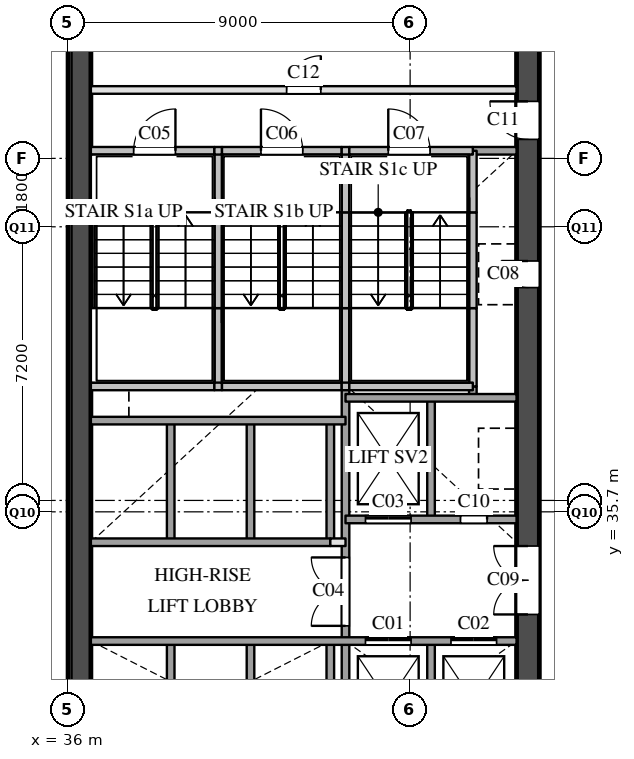
"""IFC4 building model, lengths in metres.
Left out: names, types, materials, properties, quantities, classifications, styles, units other than length and angle.
Written with IfcOpenShell. Run it as: python <this file> out.ifc"""

import sys

from ifc_helpers import new_model, si_unit, direction, frame, frame_2d, origin, place, context, subcontext, project, spatial, rectangle, extrude, element, fill, save


model = new_model("IFC4")
c1 = context("Model", 3, precision=1e-05, world=origin(), true_north=direction((0.0, 1.0)))
c2 = subcontext(c1, "Body", "Model", "MODEL_VIEW")
j1 = project(units=[si_unit("LENGTHUNIT", "METRE"), si_unit("PLANEANGLEUNIT", "RADIAN")], contexts=[c1])
p1 = place(None, origin())
s1 = spatial("IfcSite", under=j1, at=p1, CompositionType="ELEMENT")
p2 = place(p1, origin())
s2 = spatial("IfcBuilding", under=s1, at=p2, CompositionType="ELEMENT")
p3 = place(p2, frame((0.0, 0.0, 21.0)))
s3 = spatial("IfcBuildingStorey", under=s2, at=p3, CompositionType="ELEMENT", Elevation=21.0)
p4 = place(p3, frame((36.3, 29.1, 0.0), z_axis=(0.0, 0.0, 1.0), x_axis=(0.0, 1.0, 0.0)))
e1 = element("IfcWall", 1, at=p4, inside=s3, PredefinedType="SHEAR", context=c2, shape_type="SweptSolid", body=[
    extrude(rectangle(XDim=20.3, YDim=0.6, at=frame_2d((10.15, 0.0))), origin(), (0.0, 0.0, 1.0), 4.55),
])
p5 = place(p3, frame((48.1, 29.1, 0.0), z_axis=(0.0, 0.0, 1.0), x_axis=(0.0, 1.0, 0.0)))
e2 = element("IfcWall", 2, at=p5, inside=s3, PredefinedType="SHEAR", context=c2, shape_type="SweptSolid", body=[
    extrude(rectangle(XDim=20.3, YDim=0.6, at=frame_2d((10.15, 0.0))), origin(), (0.0, 0.0, 1.0), 4.55),
])
p6 = place(p5, frame((12.5, 0.0, 0.0)))
e3 = element("IfcOpeningElement", 3, at=p6, cuts=e2, PredefinedType="OPENING", context=c2, shape_type="SweptSolid", body=[
    extrude(rectangle(XDim=0.7, YDim=2.1, at=frame_2d((0.35, 1.05))), frame((0.0, 0.31, 0.0), z_axis=(0.0, -1.0, 0.0), x_axis=(1.0, 0.0, 0.0)), (0.0, 0.0, 1.0), 0.62),
])
p7 = place(p5, frame((3.9, 0.0, 0.0)))
e4 = element("IfcOpeningElement", 4, at=p7, cuts=e2, PredefinedType="OPENING", context=c2, shape_type="SweptSolid", body=[
    extrude(rectangle(XDim=1.8, YDim=2.1, at=frame_2d((0.9, 1.05))), frame((0.0, 0.31, 0.0), z_axis=(0.0, -1.0, 0.0), x_axis=(1.0, 0.0, 0.0)), (0.0, 0.0, 1.0), 0.62),
])
p8 = place(p5, frame((16.4, 0.0, 0.0)))
e5 = element("IfcOpeningElement", 5, at=p8, cuts=e2, PredefinedType="OPENING", context=c2, shape_type="SweptSolid", body=[
    extrude(rectangle(XDim=1.0, YDim=2.1, at=frame_2d((0.5, 1.05))), frame((0.0, 0.31, 0.0), z_axis=(0.0, -1.0, 0.0), x_axis=(1.0, 0.0, 0.0)), (0.0, 0.0, 1.0), 0.62),
])
p9 = place(p3, frame((38.7, 29.1, 0.0), z_axis=(0.0, 0.0, 1.0), x_axis=(0.0, 1.0, 0.0)))
e6 = element("IfcWall", 6, at=p9, inside=s3, PredefinedType="SOLIDWALL", context=c2, shape_type="SweptSolid", body=[
    extrude(rectangle(XDim=3.2, YDim=0.2, at=frame_2d((1.6, 0.0))), origin(), (0.0, 0.0, 1.0), 4.55),
])
p10 = place(p3, frame((38.7, 34.9, 0.0), z_axis=(0.0, 0.0, 1.0), x_axis=(0.0, 1.0, 0.0)))
e7 = element("IfcWall", 7, at=p10, inside=s3, PredefinedType="SOLIDWALL", context=c2, shape_type="SweptSolid", body=[
    extrude(rectangle(XDim=3.2, YDim=0.2, at=frame_2d((1.6, 0.0))), origin(), (0.0, 0.0, 1.0), 4.55),
])
p11 = place(p3, frame((39.95, 39.0, 0.0), z_axis=(0.0, 0.0, 1.0), x_axis=(0.0, 1.0, 0.0)))
e8 = element("IfcWall", 8, at=p11, inside=s3, PredefinedType="SOLIDWALL", context=c2, shape_type="SweptSolid", body=[
    extrude(rectangle(XDim=2.06, YDim=0.2, at=frame_2d((1.03, 0.0))), origin(), (0.0, 0.0, 1.0), 4.55),
])
p12 = place(p3, frame((39.95, 41.06, 0.0), z_axis=(0.0, 0.0, 1.0), x_axis=(0.0, 1.0, 0.0)))
e9 = element("IfcWall", 9, at=p12, inside=s3, PredefinedType="SOLIDWALL", context=c2, shape_type="SweptSolid", body=[
    extrude(rectangle(XDim=2.52, YDim=0.2, at=frame_2d((1.26, 0.0))), origin(), (0.0, 0.0, 1.0), 4.55),
])
p13 = place(p3, frame((39.95, 43.58, 0.0), z_axis=(0.0, 0.0, 1.0), x_axis=(0.0, 1.0, 0.0)))
e10 = element("IfcWall", 10, at=p13, inside=s3, PredefinedType="SOLIDWALL", context=c2, shape_type="SweptSolid", body=[
    extrude(rectangle(XDim=1.62, YDim=0.2, at=frame_2d((0.81, 0.0))), origin(), (0.0, 0.0, 1.0), 4.55),
])
p14 = place(p3, frame((40.8, 29.1, 0.0), z_axis=(0.0, 0.0, 1.0), x_axis=(0.0, 1.0, 0.0)))
e11 = element("IfcWall", 11, at=p14, inside=s3, PredefinedType="SOLIDWALL", context=c2, shape_type="SweptSolid", body=[
    extrude(rectangle(XDim=3.2, YDim=0.2, at=frame_2d((1.6, 0.0))), origin(), (0.0, 0.0, 1.0), 4.55),
])
p15 = place(p3, frame((40.8, 34.9, 0.0), z_axis=(0.0, 0.0, 1.0), x_axis=(0.0, 1.0, 0.0)))
e12 = element("IfcWall", 12, at=p15, inside=s3, PredefinedType="SOLIDWALL", context=c2, shape_type="SweptSolid", body=[
    extrude(rectangle(XDim=3.2, YDim=0.2, at=frame_2d((1.6, 0.0))), origin(), (0.0, 0.0, 1.0), 4.55),
])
p16 = place(p3, frame((42.9, 29.1, 0.0), z_axis=(0.0, 0.0, 1.0), x_axis=(0.0, 1.0, 0.0)))
e13 = element("IfcWall", 13, at=p16, inside=s3, PredefinedType="SOLIDWALL", context=c2, shape_type="SweptSolid", body=[
    extrude(rectangle(XDim=3.2, YDim=0.2, at=frame_2d((1.6, 0.0))), origin(), (0.0, 0.0, 1.0), 4.55),
])
p17 = place(p3, frame((42.9, 34.9, 0.0), z_axis=(0.0, 0.0, 1.0), x_axis=(0.0, 1.0, 0.0)))
e14 = element("IfcWall", 14, at=p17, inside=s3, PredefinedType="SOLIDWALL", context=c2, shape_type="SweptSolid", body=[
    extrude(rectangle(XDim=3.2, YDim=0.2, at=frame_2d((1.6, 0.0))), origin(), (0.0, 0.0, 1.0), 4.55),
])
p18 = place(p3, frame((43.3, 29.1, 0.0), z_axis=(0.0, 0.0, 1.0), x_axis=(0.0, 1.0, 0.0)))
e15 = element("IfcWall", 15, at=p18, inside=s3, PredefinedType="SOLIDWALL", context=c2, shape_type="SweptSolid", body=[
    extrude(rectangle(XDim=9.9, YDim=0.2, at=frame_2d((4.95, 0.0))), origin(), (0.0, 0.0, 1.0), 4.55),
])
p19 = place(p18, frame((3.6, 0.0, 0.0)))
e16 = element("IfcOpeningElement", 16, at=p19, cuts=e15, PredefinedType="OPENING", context=c2, shape_type="SweptSolid", body=[
    extrude(rectangle(XDim=1.8, YDim=2.1, at=frame_2d((0.9, 1.05))), frame((0.0, 0.11, 0.0), z_axis=(0.0, -1.0, 0.0), x_axis=(1.0, 0.0, 0.0)), (0.0, 0.0, 1.0), 0.22),
])
p20 = place(p3, frame((43.3, 39.0, 0.0), z_axis=(0.0, 0.0, 1.0), x_axis=(0.0, 1.0, 0.0)))
e17 = element("IfcWall", 17, at=p20, inside=s3, PredefinedType="SOLIDWALL", context=c2, shape_type="SweptSolid", body=[
    extrude(rectangle(XDim=2.06, YDim=0.2, at=frame_2d((1.03, 0.0))), origin(), (0.0, 0.0, 1.0), 4.55),
])
p21 = place(p3, frame((43.3, 41.06, 0.0), z_axis=(0.0, 0.0, 1.0), x_axis=(0.0, 1.0, 0.0)))
e18 = element("IfcWall", 18, at=p21, inside=s3, PredefinedType="SOLIDWALL", context=c2, shape_type="SweptSolid", body=[
    extrude(rectangle(XDim=2.52, YDim=0.2, at=frame_2d((1.26, 0.0))), origin(), (0.0, 0.0, 1.0), 4.55),
])
p22 = place(p3, frame((43.3, 43.58, 0.0), z_axis=(0.0, 0.0, 1.0), x_axis=(0.0, 1.0, 0.0)))
e19 = element("IfcWall", 19, at=p22, inside=s3, PredefinedType="SOLIDWALL", context=c2, shape_type="SweptSolid", body=[
    extrude(rectangle(XDim=1.62, YDim=0.2, at=frame_2d((0.81, 0.0))), origin(), (0.0, 0.0, 1.0), 4.55),
])
for number, where, z_axis, x_axis in (
    (20, (45.55, 29.1, 0.0), (0.0, 0.0, 1.0), (0.0, 1.0, 0.0)),
    (21, (45.55, 35.5, 0.0), (0.0, 0.0, 1.0), (0.0, 1.0, 0.0)),
):
    element("IfcWall", number, at=place(p3, frame(where, z_axis=z_axis, x_axis=x_axis)), inside=s3, PredefinedType="SOLIDWALL", context=c2, shape_type="SweptSolid", body=[
        extrude(rectangle(XDim=3.2, YDim=0.2, at=frame_2d((1.6, 0.0))), origin(), (0.0, 0.0, 1.0), 4.55),
    ])
p23 = place(p3, frame((46.65, 38.7, 0.0), z_axis=(0.0, 0.0, 1.0), x_axis=(0.0, 1.0, 0.0)))
e22 = element("IfcWall", 22, at=p23, inside=s3, PredefinedType="SOLIDWALL", context=c2, shape_type="SweptSolid", body=[
    extrude(rectangle(XDim=0.3, YDim=0.2, at=frame_2d((0.15, 0.0))), origin(), (0.0, 0.0, 1.0), 4.55),
])
p24 = place(p3, frame((46.65, 39.0, 0.0), z_axis=(0.0, 0.0, 1.0), x_axis=(0.0, 1.0, 0.0)))
e23 = element("IfcWall", 23, at=p24, inside=s3, PredefinedType="SOLIDWALL", context=c2, shape_type="SweptSolid", body=[
    extrude(rectangle(XDim=2.06, YDim=0.2, at=frame_2d((1.03, 0.0))), origin(), (0.0, 0.0, 1.0), 4.55),
])
p25 = place(p3, frame((46.65, 41.06, 0.0), z_axis=(0.0, 0.0, 1.0), x_axis=(0.0, 1.0, 0.0)))
e24 = element("IfcWall", 24, at=p25, inside=s3, PredefinedType="SOLIDWALL", context=c2, shape_type="SweptSolid", body=[
    extrude(rectangle(XDim=2.52, YDim=0.2, at=frame_2d((1.26, 0.0))), origin(), (0.0, 0.0, 1.0), 4.55),
])
p26 = place(p3, frame((46.65, 43.58, 0.0), z_axis=(0.0, 0.0, 1.0), x_axis=(0.0, 1.0, 0.0)))
e25 = element("IfcWall", 25, at=p26, inside=s3, PredefinedType="SOLIDWALL", context=c2, shape_type="SweptSolid", body=[
    extrude(rectangle(XDim=1.62, YDim=0.2, at=frame_2d((0.81, 0.0))), origin(), (0.0, 0.0, 1.0), 4.55),
])
p27 = place(p3, frame((36.6, 32.3, 0.0), z_axis=(0.0, 0.0, 1.0), x_axis=(1.0, 0.0, 0.0)))
e26 = element("IfcWall", 26, at=p27, inside=s3, PredefinedType="SOLIDWALL", context=c2, shape_type="SweptSolid", body=[
    extrude(rectangle(XDim=11.2, YDim=0.2, at=frame_2d((5.6, 0.0))), origin(), (0.0, 0.0, 1.0), 4.55),
])
p28 = place(p27, frame((7.225, 0.0, 0.0)))
e27 = element("IfcOpeningElement", 27, at=p28, cuts=e26, PredefinedType="OPENING", context=c2, shape_type="SweptSolid", body=[
    extrude(rectangle(XDim=1.2, YDim=2.1, at=frame_2d((0.6, 1.05))), frame((0.0, 0.11, 0.0), z_axis=(0.0, -1.0, 0.0), x_axis=(1.0, 0.0, 0.0)), (0.0, 0.0, 1.0), 0.22),
])
p29 = place(p27, frame((9.475, 0.0, 0.0)))
e28 = element("IfcOpeningElement", 28, at=p29, cuts=e26, PredefinedType="OPENING", context=c2, shape_type="SweptSolid", body=[
    extrude(rectangle(XDim=1.2, YDim=2.1, at=frame_2d((0.6, 1.05))), frame((0.0, 0.11, 0.0), z_axis=(0.0, -1.0, 0.0), x_axis=(1.0, 0.0, 0.0)), (0.0, 0.0, 1.0), 0.22),
])
p30 = place(p3, frame((42.9, 34.9, 0.0), z_axis=(0.0, 0.0, 1.0), x_axis=(1.0, 0.0, 0.0)))
e29 = element("IfcWall", 29, at=p30, inside=s3, PredefinedType="PARTITIONING", context=c2, shape_type="SweptSolid", body=[
    extrude(rectangle(XDim=0.4, YDim=0.2, at=frame_2d((0.2, 0.0))), origin(), (0.0, 0.0, 1.0), 4.55),
])
p31 = place(p3, frame((36.6, 34.9, 0.0), z_axis=(0.0, 0.0, 1.0), x_axis=(1.0, 0.0, 0.0)))
e30 = element("IfcWall", 30, at=p31, inside=s3, PredefinedType="SOLIDWALL", context=c2, shape_type="SweptSolid", body=[
    extrude(rectangle(XDim=6.3, YDim=0.2, at=frame_2d((3.15, 0.0))), origin(), (0.0, 0.0, 1.0), 4.55),
])
p32 = place(p3, frame((43.3, 35.5, 0.0), z_axis=(0.0, 0.0, 1.0), x_axis=(1.0, 0.0, 0.0)))
e31 = element("IfcWall", 31, at=p32, inside=s3, PredefinedType="SOLIDWALL", context=c2, shape_type="SweptSolid", body=[
    extrude(rectangle(XDim=4.5, YDim=0.2, at=frame_2d((2.25, 0.0))), origin(), (0.0, 0.0, 1.0), 4.55),
])
p33 = place(p32, frame((0.525, 0.0, 0.0)))
e32 = element("IfcOpeningElement", 32, at=p33, cuts=e31, PredefinedType="OPENING", context=c2, shape_type="SweptSolid", body=[
    extrude(rectangle(XDim=1.2, YDim=2.1, at=frame_2d((0.6, 1.05))), frame((0.0, 0.11, 0.0), z_axis=(0.0, -1.0, 0.0), x_axis=(1.0, 0.0, 0.0)), (0.0, 0.0, 1.0), 0.22),
])
p34 = place(p32, frame((3.025, 0.0, 0.0)))
e33 = element("IfcOpeningElement", 33, at=p34, cuts=e31, PredefinedType="OPENING", context=c2, shape_type="SweptSolid", body=[
    extrude(rectangle(XDim=0.7, YDim=2.1, at=frame_2d((0.35, 1.05))), frame((0.0, 0.11, 0.0), z_axis=(0.0, -1.0, 0.0), x_axis=(1.0, 0.0, 0.0)), (0.0, 0.0, 1.0), 0.22),
])
p35 = place(p3, frame((36.6, 38.1, 0.0), z_axis=(0.0, 0.0, 1.0), x_axis=(1.0, 0.0, 0.0)))
e34 = element("IfcWall", 34, at=p35, inside=s3, PredefinedType="SOLIDWALL", context=c2, shape_type="SweptSolid", body=[
    extrude(rectangle(XDim=6.7, YDim=0.2, at=frame_2d((3.35, 0.0))), origin(), (0.0, 0.0, 1.0), 4.55),
])
p36 = place(p3, frame((43.3, 38.7, 0.0), z_axis=(0.0, 0.0, 1.0), x_axis=(1.0, 0.0, 0.0)))
e35 = element("IfcWall", 35, at=p36, inside=s3, PredefinedType="SOLIDWALL", context=c2, shape_type="SweptSolid", body=[
    extrude(rectangle(XDim=4.5, YDim=0.2, at=frame_2d((2.25, 0.0))), origin(), (0.0, 0.0, 1.0), 4.55),
])
p37 = place(p3, frame((36.6, 39.0, 0.0), z_axis=(0.0, 0.0, 1.0), x_axis=(1.0, 0.0, 0.0)))
e36 = element("IfcWall", 36, at=p37, inside=s3, PredefinedType="SOLIDWALL", context=c2, shape_type="SweptSolid", body=[
    extrude(rectangle(XDim=3.25, YDim=0.2, at=frame_2d((1.625, 0.0))), origin(), (0.0, 0.0, 1.0), 4.55),
])
p38 = place(p3, frame((39.85, 39.0, 0.0), z_axis=(0.0, 0.0, 1.0), x_axis=(1.0, 0.0, 0.0)))
e37 = element("IfcWall", 37, at=p38, inside=s3, PredefinedType="SOLIDWALL", context=c2, shape_type="SweptSolid", body=[
    extrude(rectangle(XDim=0.2, YDim=0.2, at=frame_2d((0.1, 0.0))), origin(), (0.0, 0.0, 1.0), 4.55),
])
p39 = place(p3, frame((40.05, 39.0, 0.0), z_axis=(0.0, 0.0, 1.0), x_axis=(1.0, 0.0, 0.0)))
e38 = element("IfcWall", 38, at=p39, inside=s3, PredefinedType="SOLIDWALL", context=c2, shape_type="SweptSolid", body=[
    extrude(rectangle(XDim=3.15, YDim=0.2, at=frame_2d((1.575, 0.0))), origin(), (0.0, 0.0, 1.0), 4.55),
])
p40 = place(p3, frame((43.2, 39.0, 0.0), z_axis=(0.0, 0.0, 1.0), x_axis=(1.0, 0.0, 0.0)))
e39 = element("IfcWall", 39, at=p40, inside=s3, PredefinedType="SOLIDWALL", context=c2, shape_type="SweptSolid", body=[
    extrude(rectangle(XDim=0.2, YDim=0.2, at=frame_2d((0.1, 0.0))), origin(), (0.0, 0.0, 1.0), 4.55),
])
p41 = place(p3, frame((43.4, 39.0, 0.0), z_axis=(0.0, 0.0, 1.0), x_axis=(1.0, 0.0, 0.0)))
e40 = element("IfcWall", 40, at=p41, inside=s3, PredefinedType="SOLIDWALL", context=c2, shape_type="SweptSolid", body=[
    extrude(rectangle(XDim=3.25, YDim=0.2, at=frame_2d((1.625, 0.0))), origin(), (0.0, 0.0, 1.0), 4.55),
])
p42 = place(p3, frame((46.65, 45.2, 0.0), z_axis=(0.0, 0.0, 1.0), x_axis=(1.0, 0.0, 0.0)))
e41 = element("IfcWall", 41, at=p42, inside=s3, PredefinedType="SOLIDWALL", context=c2, shape_type="SweptSolid", body=[
    extrude(rectangle(XDim=1.15, YDim=0.2, at=frame_2d((0.575, 0.0))), origin(), (0.0, 0.0, 1.0), 4.55),
])
p43 = place(p3, frame((36.6, 45.2, 0.0), z_axis=(0.0, 0.0, 1.0), x_axis=(1.0, 0.0, 0.0)))
e42 = element("IfcWall", 42, at=p43, inside=s3, PredefinedType="SOLIDWALL", context=c2, shape_type="SweptSolid", body=[
    extrude(rectangle(XDim=3.25, YDim=0.2, at=frame_2d((1.625, 0.0))), origin(), (0.0, 0.0, 1.0), 4.55),
])
p44 = place(p43, frame((1.125, 0.0, 0.0)))
e43 = element("IfcOpeningElement", 43, at=p44, cuts=e42, PredefinedType="OPENING", context=c2, shape_type="SweptSolid", body=[
    extrude(rectangle(XDim=1.1, YDim=2.1, at=frame_2d((0.55, 1.05))), frame((0.0, 0.11, 0.0), z_axis=(0.0, -1.0, 0.0), x_axis=(1.0, 0.0, 0.0)), (0.0, 0.0, 1.0), 0.22),
])
p45 = place(p3, frame((39.85, 45.2, 0.0), z_axis=(0.0, 0.0, 1.0), x_axis=(1.0, 0.0, 0.0)))
e44 = element("IfcWall", 44, at=p45, inside=s3, PredefinedType="SOLIDWALL", context=c2, shape_type="SweptSolid", body=[
    extrude(rectangle(XDim=0.2, YDim=0.2, at=frame_2d((0.1, 0.0))), origin(), (0.0, 0.0, 1.0), 4.55),
])
p46 = place(p3, frame((40.05, 45.2, 0.0), z_axis=(0.0, 0.0, 1.0), x_axis=(1.0, 0.0, 0.0)))
e45 = element("IfcWall", 45, at=p46, inside=s3, PredefinedType="SOLIDWALL", context=c2, shape_type="SweptSolid", body=[
    extrude(rectangle(XDim=3.15, YDim=0.2, at=frame_2d((1.575, 0.0))), origin(), (0.0, 0.0, 1.0), 4.55),
])
p47 = place(p46, frame((1.025, 0.0, 0.0)))
e46 = element("IfcOpeningElement", 46, at=p47, cuts=e45, PredefinedType="OPENING", context=c2, shape_type="SweptSolid", body=[
    extrude(rectangle(XDim=1.1, YDim=2.1, at=frame_2d((0.55, 1.05))), frame((0.0, 0.11, 0.0), z_axis=(0.0, -1.0, 0.0), x_axis=(1.0, 0.0, 0.0)), (0.0, 0.0, 1.0), 0.22),
])
p48 = place(p3, frame((43.2, 45.2, 0.0), z_axis=(0.0, 0.0, 1.0), x_axis=(1.0, 0.0, 0.0)))
e47 = element("IfcWall", 47, at=p48, inside=s3, PredefinedType="SOLIDWALL", context=c2, shape_type="SweptSolid", body=[
    extrude(rectangle(XDim=0.2, YDim=0.2, at=frame_2d((0.1, 0.0))), origin(), (0.0, 0.0, 1.0), 4.55),
])
p49 = place(p3, frame((43.4, 45.2, 0.0), z_axis=(0.0, 0.0, 1.0), x_axis=(1.0, 0.0, 0.0)))
e48 = element("IfcWall", 48, at=p49, inside=s3, PredefinedType="SOLIDWALL", context=c2, shape_type="SweptSolid", body=[
    extrude(rectangle(XDim=3.25, YDim=0.2, at=frame_2d((1.625, 0.0))), origin(), (0.0, 0.0, 1.0), 4.55),
])
p50 = place(p49, frame((1.025, 0.0, 0.0)))
e49 = element("IfcOpeningElement", 49, at=p50, cuts=e48, PredefinedType="OPENING", context=c2, shape_type="SweptSolid", body=[
    extrude(rectangle(XDim=1.1, YDim=2.1, at=frame_2d((0.55, 1.05))), frame((0.0, 0.11, 0.0), z_axis=(0.0, -1.0, 0.0), x_axis=(1.0, 0.0, 0.0)), (0.0, 0.0, 1.0), 0.22),
])
p51 = place(p3, frame((36.6, 46.8, 0.0), z_axis=(0.0, 0.0, 1.0), x_axis=(1.0, 0.0, 0.0)))
e50 = element("IfcWall", 50, at=p51, inside=s3, PredefinedType="PARTITIONING", context=c2, shape_type="SweptSolid", body=[
    extrude(rectangle(XDim=11.2, YDim=0.2, at=frame_2d((5.6, 0.0))), origin(), (0.0, 0.0, 1.0), 4.55),
])
p52 = place(p51, frame((5.15, 0.0, 0.0)))
e51 = element("IfcOpeningElement", 51, at=p52, cuts=e50, PredefinedType="OPENING", context=c2, shape_type="SweptSolid", body=[
    extrude(rectangle(XDim=0.9, YDim=2.1, at=frame_2d((0.45, 1.05))), frame((0.0, 0.11, 0.0), z_axis=(0.0, -1.0, 0.0), x_axis=(1.0, 0.0, 0.0)), (0.0, 0.0, 1.0), 0.22),
])
p53 = place(p28, origin())
e52 = element("IfcDoor", 52, at=p53, inside=s3, OperationType="SLIDING_TO_LEFT", PredefinedType="DOOR", context=c2, shape_type="SweptSolid", body=[
    extrude(rectangle(XDim=1.2, YDim=2.1, at=frame_2d((0.6, 1.05))), frame((0.0, 0.025, 0.0), z_axis=(0.0, -1.0, 0.0), x_axis=(1.0, 0.0, 0.0)), (0.0, 0.0, 1.0), 0.05),
])
fill(e27, e52)
p54 = place(p29, origin())
e53 = element("IfcDoor", 53, at=p54, inside=s3, OperationType="SLIDING_TO_LEFT", PredefinedType="DOOR", context=c2, shape_type="SweptSolid", body=[
    extrude(rectangle(XDim=1.2, YDim=2.1, at=frame_2d((0.6, 1.05))), frame((0.0, 0.025, 0.0), z_axis=(0.0, -1.0, 0.0), x_axis=(1.0, 0.0, 0.0)), (0.0, 0.0, 1.0), 0.05),
])
fill(e28, e53)
p55 = place(p33, origin())
e54 = element("IfcDoor", 54, at=p55, inside=s3, OperationType="SLIDING_TO_LEFT", PredefinedType="DOOR", context=c2, shape_type="SweptSolid", body=[
    extrude(rectangle(XDim=1.2, YDim=2.1, at=frame_2d((0.6, 1.05))), frame((0.0, 0.025, 0.0), z_axis=(0.0, -1.0, 0.0), x_axis=(1.0, 0.0, 0.0)), (0.0, 0.0, 1.0), 0.05),
])
fill(e32, e54)
p56 = place(p19, origin())
e55 = element("IfcDoor", 55, at=p56, inside=s3, OperationType="DOUBLE_DOOR_SINGLE_SWING", PredefinedType="DOOR", context=c2, shape_type="SweptSolid", body=[
    extrude(rectangle(XDim=1.8, YDim=2.1, at=frame_2d((0.9, 1.05))), frame((0.0, 0.025, 0.0), z_axis=(0.0, -1.0, 0.0), x_axis=(1.0, 0.0, 0.0)), (0.0, 0.0, 1.0), 0.05),
])
fill(e16, e55)
p57 = place(p44, origin())
e56 = element("IfcDoor", 56, at=p57, inside=s3, OperationType="SINGLE_SWING_RIGHT", PredefinedType="DOOR", context=c2, shape_type="SweptSolid", body=[
    extrude(rectangle(XDim=1.1, YDim=2.1, at=frame_2d((0.55, 1.05))), frame((0.0, 0.025, 0.0), z_axis=(0.0, -1.0, 0.0), x_axis=(1.0, 0.0, 0.0)), (0.0, 0.0, 1.0), 0.05),
])
fill(e43, e56)
p58 = place(p47, origin())
e57 = element("IfcDoor", 57, at=p58, inside=s3, OperationType="SINGLE_SWING_LEFT", PredefinedType="DOOR", context=c2, shape_type="SweptSolid", body=[
    extrude(rectangle(XDim=1.1, YDim=2.1, at=frame_2d((0.55, 1.05))), frame((0.0, 0.025, 0.0), z_axis=(0.0, -1.0, 0.0), x_axis=(1.0, 0.0, 0.0)), (0.0, 0.0, 1.0), 0.05),
])
fill(e46, e57)
p59 = place(p50, origin())
e58 = element("IfcDoor", 58, at=p59, inside=s3, OperationType="SINGLE_SWING_LEFT", PredefinedType="DOOR", context=c2, shape_type="SweptSolid", body=[
    extrude(rectangle(XDim=1.1, YDim=2.1, at=frame_2d((0.55, 1.05))), frame((0.0, 0.025, 0.0), z_axis=(0.0, -1.0, 0.0), x_axis=(1.0, 0.0, 0.0)), (0.0, 0.0, 1.0), 0.05),
])
fill(e49, e58)
p60 = place(p6, origin())
e59 = element("IfcDoor", 59, at=p60, inside=s3, OperationType="SINGLE_SWING_RIGHT", PredefinedType="DOOR", context=c2, shape_type="SweptSolid", body=[
    extrude(rectangle(XDim=0.7, YDim=2.1, at=frame_2d((0.35, 1.05))), frame((0.0, 0.025, 0.0), z_axis=(0.0, -1.0, 0.0), x_axis=(1.0, 0.0, 0.0)), (0.0, 0.0, 1.0), 0.05),
])
fill(e3, e59)
p61 = place(p7, origin())
e60 = element("IfcDoor", 60, at=p61, inside=s3, OperationType="DOUBLE_DOOR_SINGLE_SWING", PredefinedType="DOOR", context=c2, shape_type="SweptSolid", body=[
    extrude(rectangle(XDim=1.8, YDim=2.1, at=frame_2d((0.9, 1.05))), frame((0.0, 0.025, 0.0), z_axis=(0.0, -1.0, 0.0), x_axis=(1.0, 0.0, 0.0)), (0.0, 0.0, 1.0), 0.05),
])
fill(e4, e60)
p62 = place(p34, origin())
e61 = element("IfcDoor", 61, at=p62, inside=s3, OperationType="SINGLE_SWING_RIGHT", PredefinedType="DOOR", context=c2, shape_type="SweptSolid", body=[
    extrude(rectangle(XDim=0.7, YDim=2.1, at=frame_2d((0.35, 1.05))), frame((0.0, 0.025, 0.0), z_axis=(0.0, -1.0, 0.0), x_axis=(1.0, 0.0, 0.0)), (0.0, 0.0, 1.0), 0.05),
])
fill(e33, e61)
p63 = place(p8, origin())
e62 = element("IfcDoor", 62, at=p63, inside=s3, OperationType="SINGLE_SWING_RIGHT", PredefinedType="DOOR", context=c2, shape_type="SweptSolid", body=[
    extrude(rectangle(XDim=1.0, YDim=2.1, at=frame_2d((0.5, 1.05))), frame((0.0, 0.025, 0.0), z_axis=(0.0, -1.0, 0.0), x_axis=(1.0, 0.0, 0.0)), (0.0, 0.0, 1.0), 0.05),
])
fill(e5, e62)
p64 = place(p52, origin())
e63 = element("IfcDoor", 63, at=p64, inside=s3, OperationType="SINGLE_SWING_RIGHT", PredefinedType="DOOR", context=c2, shape_type="SweptSolid", body=[
    extrude(rectangle(XDim=0.9, YDim=2.1, at=frame_2d((0.45, 1.05))), frame((0.0, 0.025, 0.0), z_axis=(0.0, -1.0, 0.0), x_axis=(1.0, 0.0, 0.0)), (0.0, 0.0, 1.0), 0.05),
])
fill(e51, e63)
save(model, sys.argv[1])
